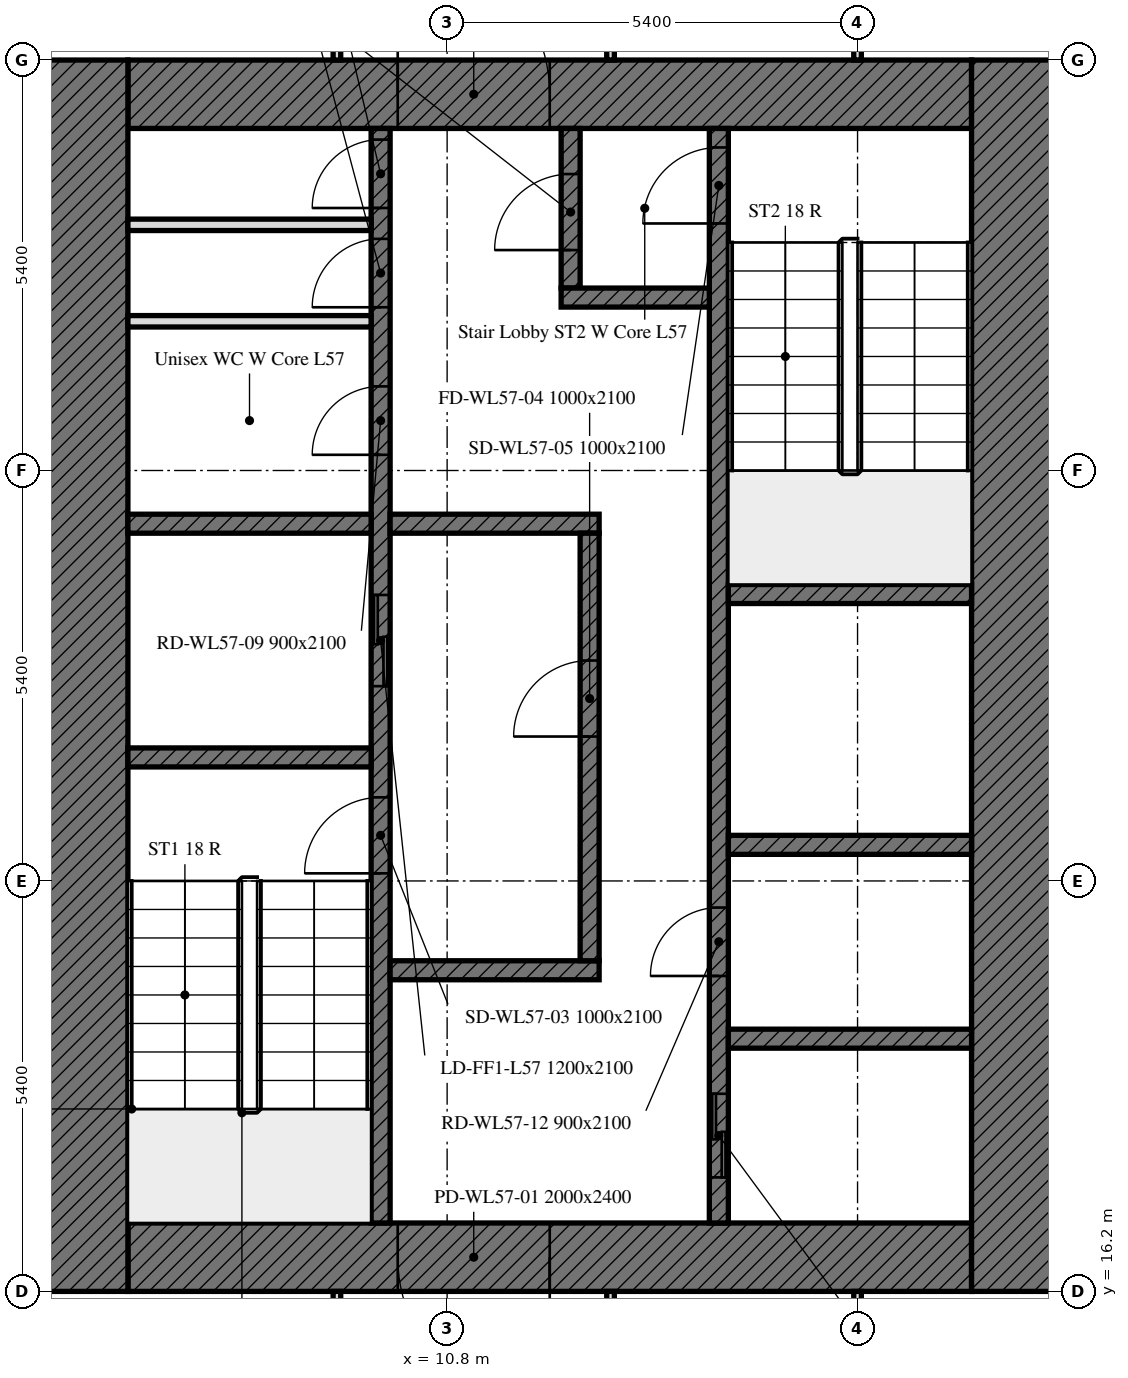
"""IFC4 building model, lengths in metres.
Left out: names, types, materials, properties, quantities, classifications, styles, units other than length and angle.
Written with IfcOpenShell. Run it as: python <this file> out.ifc"""

import sys

from ifc_helpers import new_model, si_unit, direction, frame, frame_2d, origin, place, context, subcontext, project, spatial, rectangle, extrude, element, fill, save


model = new_model("IFC4")
c1 = context("Model", 3, precision=1e-05, world=origin(), true_north=direction((0.0, 1.0)))
c2 = subcontext(c1, "Body", "Model", "MODEL_VIEW")
j1 = project(units=[si_unit("LENGTHUNIT", "METRE"), si_unit("PLANEANGLEUNIT", "RADIAN")], contexts=[c1])
p1 = place(None, origin())
s1 = spatial("IfcSite", under=j1, at=p1, CompositionType="ELEMENT")
p2 = place(p1, origin())
s2 = spatial("IfcBuilding", under=s1, at=p2, CompositionType="ELEMENT")
p3 = place(p2, frame((0.0, 0.0, 226.9)))
s3 = spatial("IfcBuildingStorey", under=s2, at=p3, CompositionType="ELEMENT", Elevation=226.9)
p4 = place(p3, frame((17.7, 16.65, 0.0), z_axis=(0.0, 0.0, 1.0), x_axis=(-1.0, 0.0, 0.0)))
e1 = element("IfcWall", 1, at=p4, inside=s3, PredefinedType="SOLIDWALL", context=c2, shape_type="SweptSolid", body=[
    extrude(rectangle(XDim=11.1, YDim=0.9, at=frame_2d((5.55, 0.0))), origin(), (0.0, 0.0, 1.0), 3.0),
])
p5 = place(p4, frame((5.55, 0.0, 0.0)))
e2 = element("IfcOpeningElement", 2, at=p5, cuts=e1, PredefinedType="OPENING", context=c2, shape_type="SweptSolid", body=[
    extrude(rectangle(XDim=2.0, YDim=2.4, at=frame_2d((1.0, 1.2))), frame((0.0, 0.45, 0.0), z_axis=(0.0, -1.0, 0.0), x_axis=(1.0, 0.0, 0.0)), (0.0, 0.0, 1.0), 0.9),
])
p6 = place(p3, frame((6.6, 31.95, 0.0), z_axis=(0.0, 0.0, 1.0), x_axis=(1.0, 0.0, 0.0)))
e3 = element("IfcWall", 3, at=p6, inside=s3, PredefinedType="SOLIDWALL", context=c2, shape_type="SweptSolid", body=[
    extrude(rectangle(XDim=11.1, YDim=0.9, at=frame_2d((5.55, 0.0))), origin(), (0.0, 0.0, 1.0), 3.0),
])
p7 = place(p6, frame((3.55, 0.0, 0.0)))
e4 = element("IfcOpeningElement", 4, at=p7, cuts=e3, PredefinedType="OPENING", context=c2, shape_type="SweptSolid", body=[
    extrude(rectangle(XDim=2.0, YDim=2.4, at=frame_2d((1.0, 1.2))), frame((0.0, 0.45, 0.0), z_axis=(0.0, -1.0, 0.0), x_axis=(1.0, 0.0, 0.0)), (0.0, 0.0, 1.0), 0.9),
])
for number, where, z_axis, x_axis in (
    (5, (6.0, 16.2, 0.0), (0.0, 0.0, 1.0), (0.0, 1.0, 0.0)),
    (6, (18.3, 32.4, 0.0), (0.0, 0.0, 1.0), (0.0, -1.0, 0.0)),
):
    element("IfcWall", number, at=place(p3, frame(where, z_axis=z_axis, x_axis=x_axis)), inside=s3, PredefinedType="SOLIDWALL", context=c2, shape_type="SweptSolid", body=[
        extrude(rectangle(XDim=16.2, YDim=1.2, at=frame_2d((8.1, 0.0))), origin(), (0.0, 0.0, 1.0), 3.0),
    ])
p8 = place(p3, frame((9.925, 17.1, 0.0), z_axis=(0.0, 0.0, 1.0), x_axis=(0.0, 1.0, 0.0)))
e7 = element("IfcWall", 7, at=p8, inside=s3, PredefinedType="SOLIDWALL", context=c2, shape_type="SweptSolid", body=[
    extrude(rectangle(XDim=14.4, YDim=0.25, at=frame_2d((7.2, 0.0))), origin(), (0.0, 0.0, 1.0), 3.0),
])
p9 = place(p8, frame((4.6, 0.0, 0.0)))
e8 = element("IfcOpeningElement", 8, at=p9, cuts=e7, PredefinedType="OPENING", context=c2, shape_type="SweptSolid", body=[
    extrude(rectangle(XDim=1.0, YDim=2.1, at=frame_2d((0.5, 1.05))), frame((0.0, 0.125, 0.0), z_axis=(0.0, -1.0, 0.0), x_axis=(1.0, 0.0, 0.0)), (0.0, 0.0, 1.0), 0.25),
])
p10 = place(p8, frame((7.062, 0.0, 0.0)))
e9 = element("IfcOpeningElement", 9, at=p10, cuts=e7, PredefinedType="OPENING", context=c2, shape_type="SweptSolid", body=[
    extrude(rectangle(XDim=1.2, YDim=2.1, at=frame_2d((0.6, 1.05))), frame((0.0, 0.125, 0.0), z_axis=(0.0, -1.0, 0.0), x_axis=(1.0, 0.0, 0.0)), (0.0, 0.0, 1.0), 0.25),
])
p11 = place(p8, frame((10.106, 0.0, 0.0)))
e10 = element("IfcOpeningElement", 10, at=p11, cuts=e7, PredefinedType="OPENING", context=c2, shape_type="SweptSolid", body=[
    extrude(rectangle(XDim=0.9, YDim=2.1, at=frame_2d((0.45, 1.05))), frame((0.0, 0.125, 0.0), z_axis=(0.0, -1.0, 0.0), x_axis=(1.0, 0.0, 0.0)), (0.0, 0.0, 1.0), 0.25),
])
p12 = place(p8, frame((12.048, 0.0, 0.0)))
e11 = element("IfcOpeningElement", 11, at=p12, cuts=e7, PredefinedType="OPENING", context=c2, shape_type="SweptSolid", body=[
    extrude(rectangle(XDim=0.9, YDim=2.1, at=frame_2d((0.45, 1.05))), frame((0.0, 0.125, 0.0), z_axis=(0.0, -1.0, 0.0), x_axis=(1.0, 0.0, 0.0)), (0.0, 0.0, 1.0), 0.25),
])
p13 = place(p8, frame((13.354, 0.0, 0.0)))
e12 = element("IfcOpeningElement", 12, at=p13, cuts=e7, PredefinedType="OPENING", context=c2, shape_type="SweptSolid", body=[
    extrude(rectangle(XDim=0.9, YDim=2.1, at=frame_2d((0.45, 1.05))), frame((0.0, 0.125, 0.0), z_axis=(0.0, -1.0, 0.0), x_axis=(1.0, 0.0, 0.0)), (0.0, 0.0, 1.0), 0.25),
])
p14 = place(p3, frame((14.375, 17.1, 0.0), z_axis=(0.0, 0.0, 1.0), x_axis=(0.0, 1.0, 0.0)))
e13 = element("IfcWall", 13, at=p14, inside=s3, PredefinedType="SOLIDWALL", context=c2, shape_type="SweptSolid", body=[
    extrude(rectangle(XDim=14.4, YDim=0.25, at=frame_2d((7.2, 0.0))), origin(), (0.0, 0.0, 1.0), 3.0),
])
p15 = place(p14, frame((13.15, 0.0, 0.0)))
e14 = element("IfcOpeningElement", 14, at=p15, cuts=e13, PredefinedType="OPENING", context=c2, shape_type="SweptSolid", body=[
    extrude(rectangle(XDim=1.0, YDim=2.1, at=frame_2d((0.5, 1.05))), frame((0.0, 0.125, 0.0), z_axis=(0.0, -1.0, 0.0), x_axis=(1.0, 0.0, 0.0)), (0.0, 0.0, 1.0), 0.25),
])
p16 = place(p14, frame((0.6, 0.0, 0.0)))
e15 = element("IfcOpeningElement", 15, at=p16, cuts=e13, PredefinedType="OPENING", context=c2, shape_type="SweptSolid", body=[
    extrude(rectangle(XDim=1.1, YDim=2.1, at=frame_2d((0.55, 1.05))), frame((0.0, 0.125, 0.0), z_axis=(0.0, -1.0, 0.0), x_axis=(1.0, 0.0, 0.0)), (0.0, 0.0, 1.0), 0.25),
])
p17 = place(p14, frame((3.25, 0.0, 0.0)))
e16 = element("IfcOpeningElement", 16, at=p17, cuts=e13, PredefinedType="OPENING", context=c2, shape_type="SweptSolid", body=[
    extrude(rectangle(XDim=0.9, YDim=2.1, at=frame_2d((0.45, 1.05))), frame((0.0, 0.125, 0.0), z_axis=(0.0, -1.0, 0.0), x_axis=(1.0, 0.0, 0.0)), (0.0, 0.0, 1.0), 0.25),
])
for number, where, z_axis, x_axis in (
    (17, (6.6, 23.225, 0.0), (0.0, 0.0, 1.0), (1.0, 0.0, 0.0)),
    (18, (14.5, 25.375, 0.0), (0.0, 0.0, 1.0), (1.0, 0.0, 0.0)),
    (19, (14.5, 22.075, 0.0), (0.0, 0.0, 1.0), (1.0, 0.0, 0.0)),
    (20, (6.6, 26.3, 0.0), (0.0, 0.0, 1.0), (1.0, 0.0, 0.0)),
):
    element("IfcWall", number, at=place(p3, frame(where, z_axis=z_axis, x_axis=x_axis)), inside=s3, PredefinedType="SOLIDWALL", context=c2, shape_type="SweptSolid", body=[
        extrude(rectangle(XDim=3.2, YDim=0.25, at=frame_2d((1.6, 0.0))), origin(), (0.0, 0.0, 1.0), 3.0),
    ])
for number, where, z_axis, x_axis in (
    (21, (10.05, 26.3, 0.0), (0.0, 0.0, 1.0), (1.0, 0.0, 0.0)),
    (22, (10.05, 20.425, 0.0), (0.0, 0.0, 1.0), (1.0, 0.0, 0.0)),
):
    element("IfcWall", number, at=place(p3, frame(where, z_axis=z_axis, x_axis=x_axis)), inside=s3, PredefinedType="SOLIDWALL", context=c2, shape_type="SweptSolid", body=[
        extrude(rectangle(XDim=2.75, YDim=0.25, at=frame_2d((1.375, 0.0))), origin(), (0.0, 0.0, 1.0), 3.0),
    ])
p18 = place(p3, frame((12.425, 29.4, 0.0), z_axis=(0.0, 0.0, 1.0), x_axis=(0.0, 1.0, 0.0)))
e23 = element("IfcWall", 23, at=p18, inside=s3, PredefinedType="SOLIDWALL", context=c2, shape_type="SweptSolid", body=[
    extrude(rectangle(XDim=2.1, YDim=0.25, at=frame_2d((1.05, 0.0))), origin(), (0.0, 0.0, 1.0), 3.0),
])
p19 = place(p18, frame((0.5, 0.0, 0.0)))
e24 = element("IfcOpeningElement", 24, at=p19, cuts=e23, PredefinedType="OPENING", context=c2, shape_type="SweptSolid", body=[
    extrude(rectangle(XDim=1.0, YDim=2.1, at=frame_2d((0.5, 1.05))), frame((0.0, 0.125, 0.0), z_axis=(0.0, -1.0, 0.0), x_axis=(1.0, 0.0, 0.0)), (0.0, 0.0, 1.0), 0.25),
])
p20 = place(p3, frame((12.3, 29.275, 0.0), z_axis=(0.0, 0.0, 1.0), x_axis=(1.0, 0.0, 0.0)))
e25 = element("IfcWall", 25, at=p20, inside=s3, PredefinedType="SOLIDWALL", context=c2, shape_type="SweptSolid", body=[
    extrude(rectangle(XDim=1.95, YDim=0.25, at=frame_2d((0.975, 0.0))), origin(), (0.0, 0.0, 1.0), 3.0),
])
p21 = place(p3, frame((12.675, 20.55, 0.0), z_axis=(0.0, 0.0, 1.0), x_axis=(0.0, 1.0, 0.0)))
e26 = element("IfcWall", 26, at=p21, inside=s3, PredefinedType="SOLIDWALL", context=c2, shape_type="SweptSolid", body=[
    extrude(rectangle(XDim=5.625, YDim=0.25, at=frame_2d((2.812, 0.0))), origin(), (0.0, 0.0, 1.0), 3.0),
])
p22 = place(p21, frame((2.95, 0.0, 0.0)))
e27 = element("IfcOpeningElement", 27, at=p22, cuts=e26, PredefinedType="OPENING", context=c2, shape_type="SweptSolid", body=[
    extrude(rectangle(XDim=1.0, YDim=2.1, at=frame_2d((0.5, 1.05))), frame((0.0, 0.125, 0.0), z_axis=(0.0, -1.0, 0.0), x_axis=(1.0, 0.0, 0.0)), (0.0, 0.0, 1.0), 0.25),
])
p23 = place(p3, frame((14.5, 19.525, 0.0), z_axis=(0.0, 0.0, 1.0), x_axis=(1.0, 0.0, 0.0)))
e28 = element("IfcWall", 28, at=p23, inside=s3, PredefinedType="SOLIDWALL", context=c2, shape_type="SweptSolid", body=[
    extrude(rectangle(XDim=3.2, YDim=0.25, at=frame_2d((1.6, 0.0))), origin(), (0.0, 0.0, 1.0), 3.0),
])
for number, where, z_axis, x_axis in (
    (29, (6.6, 28.963, 0.0), (0.0, 0.0, 1.0), (1.0, 0.0, 0.0)),
    (30, (6.6, 30.232, 0.0), (0.0, 0.0, 1.0), (1.0, 0.0, 0.0)),
):
    element("IfcWall", number, at=place(p3, frame(where, z_axis=z_axis, x_axis=x_axis)), inside=s3, PredefinedType="PARTITIONING", context=c2, shape_type="SweptSolid", body=[
        extrude(rectangle(XDim=3.2, YDim=0.15, at=frame_2d((1.6, 0.0))), origin(), (0.0, 0.0, 1.0), 3.0),
    ])
p24 = place(p3, frame((16.2, 37.405, 0.0), z_axis=(0.0, 0.0, 1.0), x_axis=(0.0, -1.0, 0.0)))
e31 = element("IfcWall", 31, at=p24, inside=s3, PredefinedType="PARTITIONING", context=c2, shape_type="SweptSolid", body=[
    extrude(rectangle(XDim=5.005, YDim=0.1, at=frame_2d((2.502, 0.0))), origin(), (0.0, 0.0, 1.0), 2.4),
])
for number, where, z_axis, x_axis in (
    (32, (12.95, 32.4, 0.0), (0.0, 0.0, 1.0), (0.0, 1.0, 0.0)),
    (33, (9.35, 40.425, 0.0), (0.0, 0.0, 1.0), (0.0, -1.0, 0.0)),
):
    element("IfcWall", number, at=place(p3, frame(where, z_axis=z_axis, x_axis=x_axis)), inside=s3, PredefinedType="PARTITIONING", context=c2, shape_type="SweptSolid", body=[
        extrude(rectangle(XDim=8.025, YDim=0.1, at=frame_2d((4.013, 0.0))), origin(), (0.0, 0.0, 1.0), 2.4),
    ])
for number, where, z_axis, x_axis in (
    (34, (16.2, 16.2, 0.0), (0.0, 0.0, 1.0), (0.0, -1.0, 0.0)),
    (35, (12.95, 13.575, 0.0), (0.0, 0.0, 1.0), (0.0, 1.0, 0.0)),
    (36, (9.35, 16.2, 0.0), (0.0, 0.0, 1.0), (0.0, -1.0, 0.0)),
):
    element("IfcWall", number, at=place(p3, frame(where, z_axis=z_axis, x_axis=x_axis)), inside=s3, PredefinedType="PARTITIONING", context=c2, shape_type="SweptSolid", body=[
        extrude(rectangle(XDim=2.625, YDim=0.1, at=frame_2d((1.312, 0.0))), origin(), (0.0, 0.0, 1.0), 3.0),
    ])
p25 = place(p5, origin())
e37 = element("IfcDoor", 37, at=p25, inside=s3, OperationType="DOUBLE_DOOR_SINGLE_SWING", PredefinedType="DOOR", context=c2, shape_type="SweptSolid", body=[
    extrude(rectangle(XDim=2.0, YDim=2.4, at=frame_2d((1.0, 1.2))), frame((0.0, 0.025, 0.0), z_axis=(0.0, -1.0, 0.0), x_axis=(1.0, 0.0, 0.0)), (0.0, 0.0, 1.0), 0.05),
])
fill(e2, e37)
p26 = place(p7, origin())
e38 = element("IfcDoor", 38, at=p26, inside=s3, OperationType="DOUBLE_DOOR_SINGLE_SWING", PredefinedType="DOOR", context=c2, shape_type="SweptSolid", body=[
    extrude(rectangle(XDim=2.0, YDim=2.4, at=frame_2d((1.0, 1.2))), frame((0.0, 0.025, 0.0), z_axis=(0.0, -1.0, 0.0), x_axis=(1.0, 0.0, 0.0)), (0.0, 0.0, 1.0), 0.05),
])
fill(e4, e38)
p27 = place(p9, origin())
e39 = element("IfcDoor", 39, at=p27, inside=s3, OperationType="SINGLE_SWING_LEFT", PredefinedType="DOOR", context=c2, shape_type="SweptSolid", body=[
    extrude(rectangle(XDim=1.0, YDim=2.1, at=frame_2d((0.5, 1.05))), frame((0.0, 0.025, 0.0), z_axis=(0.0, -1.0, 0.0), x_axis=(1.0, 0.0, 0.0)), (0.0, 0.0, 1.0), 0.05),
])
fill(e8, e39)
p28 = place(p22, origin())
e40 = element("IfcDoor", 40, at=p28, inside=s3, OperationType="SINGLE_SWING_LEFT", PredefinedType="DOOR", context=c2, shape_type="SweptSolid", body=[
    extrude(rectangle(XDim=1.0, YDim=2.1, at=frame_2d((0.5, 1.05))), frame((0.0, 0.025, 0.0), z_axis=(0.0, -1.0, 0.0), x_axis=(1.0, 0.0, 0.0)), (0.0, 0.0, 1.0), 0.05),
])
fill(e27, e40)
p29 = place(p15, origin())
e41 = element("IfcDoor", 41, at=p29, inside=s3, OperationType="SINGLE_SWING_LEFT", PredefinedType="DOOR", context=c2, shape_type="SweptSolid", body=[
    extrude(rectangle(XDim=1.0, YDim=2.1, at=frame_2d((0.5, 1.05))), frame((0.0, 0.025, 0.0), z_axis=(0.0, -1.0, 0.0), x_axis=(1.0, 0.0, 0.0)), (0.0, 0.0, 1.0), 0.05),
])
fill(e14, e41)
p30 = place(p19, origin())
e42 = element("IfcDoor", 42, at=p30, inside=s3, OperationType="SINGLE_SWING_LEFT", PredefinedType="DOOR", context=c2, shape_type="SweptSolid", body=[
    extrude(rectangle(XDim=1.0, YDim=2.1, at=frame_2d((0.5, 1.05))), frame((0.0, 0.025, 0.0), z_axis=(0.0, -1.0, 0.0), x_axis=(1.0, 0.0, 0.0)), (0.0, 0.0, 1.0), 0.05),
])
fill(e24, e42)
p31 = place(p10, origin())
e43 = element("IfcDoor", 43, at=p31, inside=s3, OperationType="DOUBLE_DOOR_SLIDING", PredefinedType="DOOR", context=c2, shape_type="SweptSolid", body=[
    extrude(rectangle(XDim=1.2, YDim=2.1, at=frame_2d((0.6, 1.05))), frame((0.0, 0.025, 0.0), z_axis=(0.0, -1.0, 0.0), x_axis=(1.0, 0.0, 0.0)), (0.0, 0.0, 1.0), 0.05),
])
fill(e9, e43)
p32 = place(p16, origin())
e44 = element("IfcDoor", 44, at=p32, inside=s3, OperationType="DOUBLE_DOOR_SLIDING", PredefinedType="DOOR", context=c2, shape_type="SweptSolid", body=[
    extrude(rectangle(XDim=1.1, YDim=2.1, at=frame_2d((0.55, 1.05))), frame((0.0, 0.025, 0.0), z_axis=(0.0, -1.0, 0.0), x_axis=(1.0, 0.0, 0.0)), (0.0, 0.0, 1.0), 0.05),
])
fill(e15, e44)
p33 = place(p11, origin())
e45 = element("IfcDoor", 45, at=p33, inside=s3, OperationType="SINGLE_SWING_LEFT", PredefinedType="DOOR", context=c2, shape_type="SweptSolid", body=[
    extrude(rectangle(XDim=0.9, YDim=2.1, at=frame_2d((0.45, 1.05))), frame((0.0, 0.025, 0.0), z_axis=(0.0, -1.0, 0.0), x_axis=(1.0, 0.0, 0.0)), (0.0, 0.0, 1.0), 0.05),
])
fill(e10, e45)
p34 = place(p12, origin())
e46 = element("IfcDoor", 46, at=p34, inside=s3, OperationType="SINGLE_SWING_LEFT", PredefinedType="DOOR", context=c2, shape_type="SweptSolid", body=[
    extrude(rectangle(XDim=0.9, YDim=2.1, at=frame_2d((0.45, 1.05))), frame((0.0, 0.025, 0.0), z_axis=(0.0, -1.0, 0.0), x_axis=(1.0, 0.0, 0.0)), (0.0, 0.0, 1.0), 0.05),
])
fill(e11, e46)
p35 = place(p13, origin())
e47 = element("IfcDoor", 47, at=p35, inside=s3, OperationType="SINGLE_SWING_LEFT", PredefinedType="DOOR", context=c2, shape_type="SweptSolid", body=[
    extrude(rectangle(XDim=0.9, YDim=2.1, at=frame_2d((0.45, 1.05))), frame((0.0, 0.025, 0.0), z_axis=(0.0, -1.0, 0.0), x_axis=(1.0, 0.0, 0.0)), (0.0, 0.0, 1.0), 0.05),
])
fill(e12, e47)
p36 = place(p17, origin())
e48 = element("IfcDoor", 48, at=p36, inside=s3, OperationType="SINGLE_SWING_LEFT", PredefinedType="DOOR", context=c2, shape_type="SweptSolid", body=[
    extrude(rectangle(XDim=0.9, YDim=2.1, at=frame_2d((0.45, 1.05))), frame((0.0, 0.025, 0.0), z_axis=(0.0, -1.0, 0.0), x_axis=(1.0, 0.0, 0.0)), (0.0, 0.0, 1.0), 0.05),
])
fill(e16, e48)
save(model, sys.argv[1])
